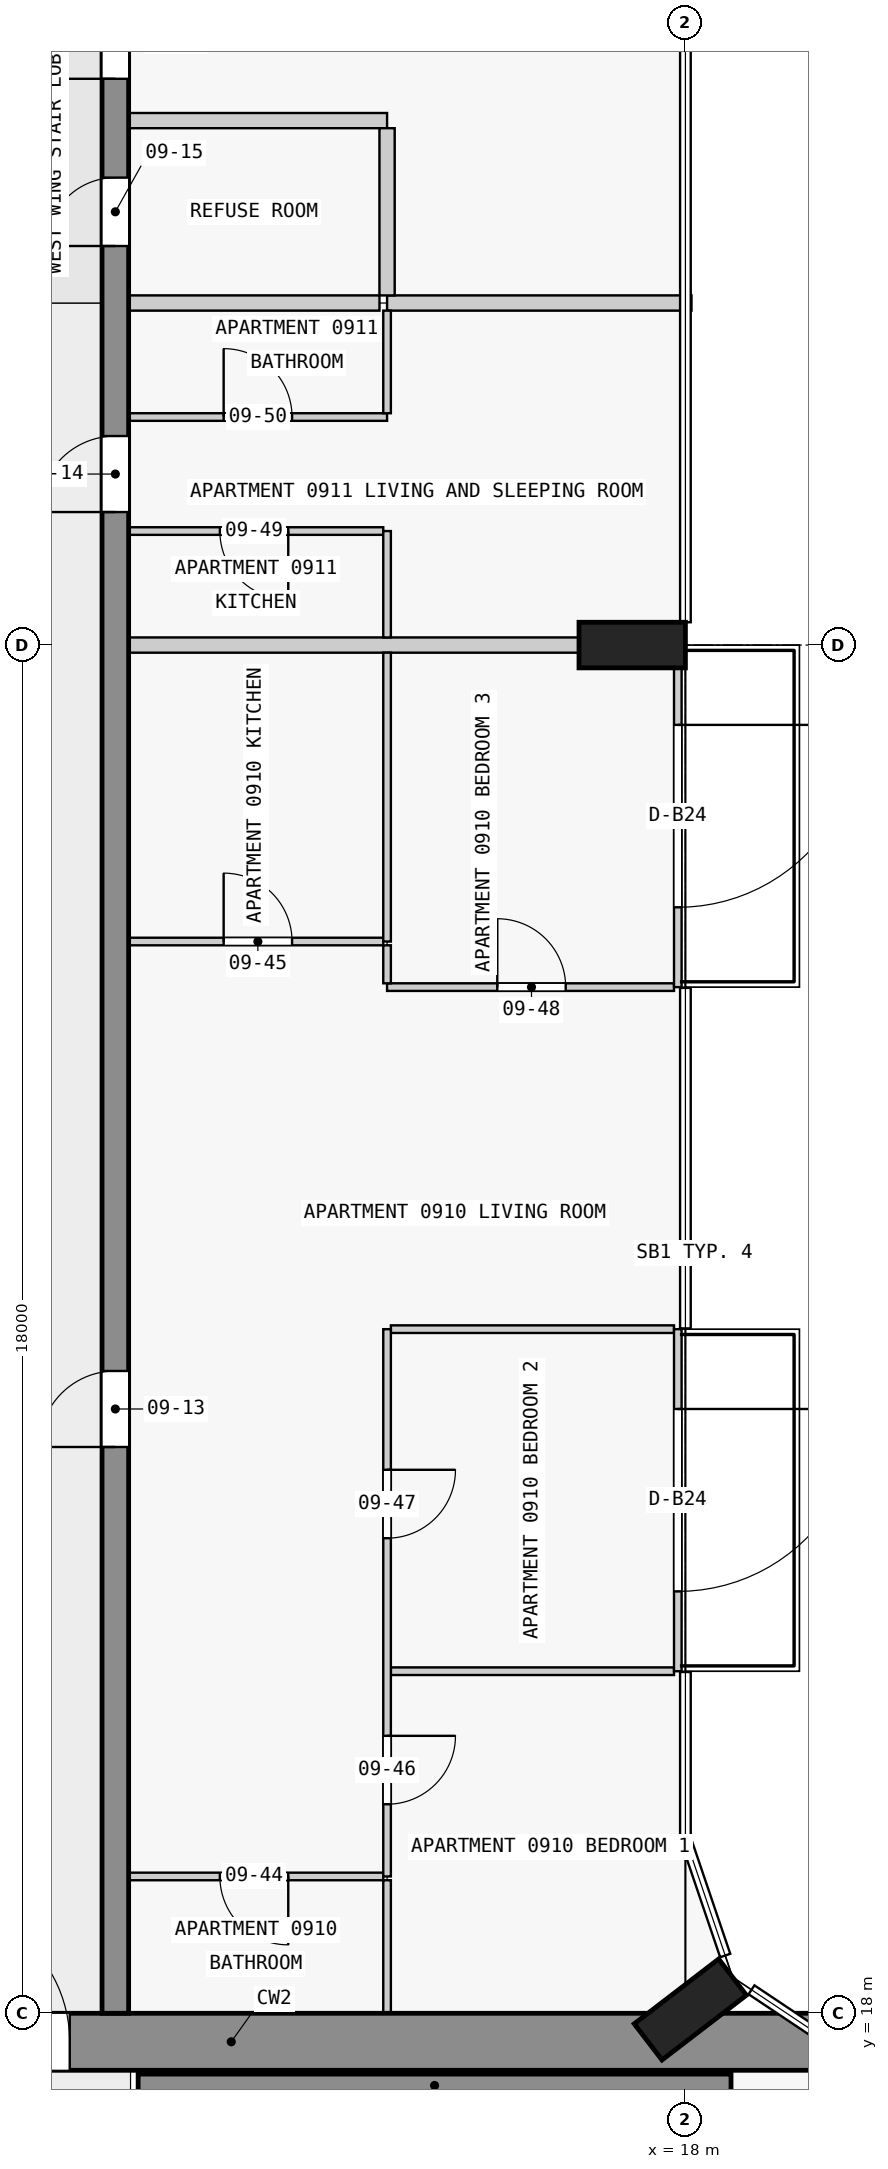
"""IFC4 building model, lengths in metres.
Left out: names, types, materials, properties, quantities, classifications, styles, units other than length and angle.
Written with IfcOpenShell. Run it as: python <this file> out.ifc"""

import sys

from ifc_helpers import new_model, si_unit, direction, frame, frame_2d, origin, origin_2d, place, context, subcontext, project, spatial, rectangle, extrude, element, fill, save


model = new_model("IFC4")
c1 = context("Model", 3, precision=1e-05, world=origin(), true_north=direction((0.0, 1.0)))
c2 = subcontext(c1, "Body", "Model", "MODEL_VIEW")
j1 = project(units=[si_unit("LENGTHUNIT", "METRE"), si_unit("PLANEANGLEUNIT", "RADIAN")], contexts=[c1])
p1 = place(None, origin())
s1 = spatial("IfcSite", under=j1, at=p1, CompositionType="ELEMENT")
p2 = place(p1, origin())
s2 = spatial("IfcBuilding", under=s1, at=p2, CompositionType="ELEMENT")
p3 = place(p2, frame((0.0, 0.0, 40.8)))
s3 = spatial("IfcBuildingStorey", under=s2, at=p3, CompositionType="ELEMENT", Elevation=40.8)
for number, where, z_axis, x_axis in (
    (1, (18.065, 18.05, 0.0), (0.0, 0.0, 1.0), (-0.609, 0.793, 0.0)),
    (2, (17.3, 36.0, 0.0), (0.0, 0.0, 1.0), (0.0, 1.0, 0.0)),
):
    element("IfcColumn", number, at=place(p3, frame(where, z_axis=z_axis, x_axis=x_axis)), inside=s3, PredefinedType="COLUMN", context=c2, shape_type="SweptSolid", body=[
        extrude(rectangle(XDim=0.6, YDim=1.4, at=origin_2d()), origin(), (0.0, 0.0, 1.0), 3.5),
    ])
p4 = place(p3, frame((1.55, 17.625, 0.0), z_axis=(0.0, 0.0, 1.0), x_axis=(1.0, 0.0, 0.0)))
e3 = element("IfcWall", 3, at=p4, inside=s3, PredefinedType="SHEAR", context=c2, shape_type="SweptSolid", body=[
    extrude(rectangle(XDim=20.95, YDim=0.75, at=frame_2d((10.475, 0.0))), origin(), (0.0, 0.0, 1.0), 3.25),
])
p5 = place(p4, frame((6.55, 0.0, 0.0)))
e4 = element("IfcOpeningElement", 4, at=p5, cuts=e3, PredefinedType="OPENING", context=c2, shape_type="SweptSolid", body=[
    extrude(rectangle(XDim=1.8, YDim=2.1, at=frame_2d((0.9, 1.05))), frame((0.0, 0.385, 0.0), z_axis=(0.0, -1.0, 0.0), x_axis=(1.0, 0.0, 0.0)), (0.0, 0.0, 1.0), 0.77),
])
p6 = place(p3, frame((10.8, 17.05, 0.0), z_axis=(0.0, 0.0, 1.0), x_axis=(1.0, 0.0, 0.0)))
e5 = element("IfcWall", 5, at=p6, inside=s3, PredefinedType="SHEAR", context=c2, shape_type="SweptSolid", body=[
    extrude(rectangle(XDim=7.8, YDim=0.3, at=frame_2d((3.9, 0.0))), origin(), (0.0, 0.0, 1.0), 3.25),
])
p7 = place(p3, frame((10.5, 18.0, 0.0), z_axis=(0.0, 0.0, 1.0), x_axis=(0.0, 1.0, 0.0)))
e6 = element("IfcWall", 6, at=p7, inside=s3, PredefinedType="SHEAR", context=c2, shape_type="SweptSolid", body=[
    extrude(rectangle(XDim=27.0, YDim=0.35, at=frame_2d((13.5, 0.0))), origin(), (0.0, 0.0, 1.0), 3.25),
])
p8 = place(p7, frame((7.45, 0.0, 0.0)))
e7 = element("IfcOpeningElement", 7, at=p8, cuts=e6, PredefinedType="OPENING", context=c2, shape_type="SweptSolid", body=[
    extrude(rectangle(XDim=1.0, YDim=2.1, at=frame_2d((0.5, 1.05))), frame((0.0, 0.185, 0.0), z_axis=(0.0, -1.0, 0.0), x_axis=(1.0, 0.0, 0.0)), (0.0, 0.0, 1.0), 0.37),
])
p9 = place(p7, frame((19.75, 0.0, 0.0)))
e8 = element("IfcOpeningElement", 8, at=p9, cuts=e6, PredefinedType="OPENING", context=c2, shape_type="SweptSolid", body=[
    extrude(rectangle(XDim=1.0, YDim=2.1, at=frame_2d((0.5, 1.05))), frame((0.0, 0.185, 0.0), z_axis=(0.0, -1.0, 0.0), x_axis=(1.0, 0.0, 0.0)), (0.0, 0.0, 1.0), 0.37),
])
p10 = place(p7, frame((23.25, 0.0, 0.0)))
e9 = element("IfcOpeningElement", 9, at=p10, cuts=e6, PredefinedType="OPENING", context=c2, shape_type="SweptSolid", body=[
    extrude(rectangle(XDim=0.9, YDim=2.1, at=frame_2d((0.45, 1.05))), frame((0.0, 0.185, 0.0), z_axis=(0.0, -1.0, 0.0), x_axis=(1.0, 0.0, 0.0)), (0.0, 0.0, 1.0), 0.37),
])
p11 = place(p7, frame((25.45, 0.0, 0.0)))
e10 = element("IfcOpeningElement", 10, at=p11, cuts=e6, PredefinedType="OPENING", context=c2, shape_type="SweptSolid", body=[
    extrude(rectangle(XDim=1.0, YDim=2.1, at=frame_2d((0.5, 1.05))), frame((0.0, 0.185, 0.0), z_axis=(0.0, -1.0, 0.0), x_axis=(1.0, 0.0, 0.0)), (0.0, 0.0, 1.0), 0.37),
])
p12 = place(p3, frame((17.9, 27.0, 0.0), z_axis=(0.0, 0.0, 1.0), x_axis=(0.0, -1.0, 0.0)))
e11 = element("IfcWall", 11, at=p12, inside=s3, PredefinedType="STANDARD", context=c2, shape_type="SweptSolid", body=[
    extrude(rectangle(XDim=4.5, YDim=0.1, at=frame_2d((2.25, 0.0))), origin(), (0.0, 0.0, 1.0), 3.25),
])
p13 = place(p12, frame((1.05, 0.0, 0.0)))
e12 = element("IfcOpeningElement", 12, at=p13, cuts=e11, PredefinedType="OPENING", context=c2, shape_type="SweptSolid", body=[
    extrude(rectangle(XDim=2.4, YDim=2.4, at=frame_2d((1.2, 1.2))), frame((0.0, 0.06, 0.0), z_axis=(0.0, -1.0, 0.0), x_axis=(1.0, 0.0, 0.0)), (0.0, 0.0, 1.0), 0.12),
])
p14 = place(p3, frame((17.9, 36.0, 0.0), z_axis=(0.0, 0.0, 1.0), x_axis=(0.0, -1.0, 0.0)))
e13 = element("IfcWall", 13, at=p14, inside=s3, PredefinedType="STANDARD", context=c2, shape_type="SweptSolid", body=[
    extrude(rectangle(XDim=4.5, YDim=0.1, at=frame_2d((2.25, 0.0))), origin(), (0.0, 0.0, 1.0), 3.25),
])
p15 = place(p14, frame((1.05, 0.0, 0.0)))
e14 = element("IfcOpeningElement", 14, at=p15, cuts=e13, PredefinedType="OPENING", context=c2, shape_type="SweptSolid", body=[
    extrude(rectangle(XDim=2.4, YDim=2.4, at=frame_2d((1.2, 1.2))), frame((0.0, 0.06, 0.0), z_axis=(0.0, -1.0, 0.0), x_axis=(1.0, 0.0, 0.0)), (0.0, 0.0, 1.0), 0.12),
])
p16 = place(p3, frame((14.025, 19.8, 0.0), z_axis=(0.0, 0.0, 1.0), x_axis=(-1.0, 0.0, 0.0)))
e15 = element("IfcWall", 15, at=p16, inside=s3, PredefinedType="PARTITIONING", context=c2, shape_type="SweptSolid", body=[
    extrude(rectangle(XDim=3.35, YDim=0.1, at=frame_2d((1.675, 0.0))), origin(), (0.0, 0.0, 1.0), 3.25),
])
p17 = place(p16, frame((1.25, 0.0, 0.0)))
e16 = element("IfcOpeningElement", 16, at=p17, cuts=e15, PredefinedType="OPENING", context=c2, shape_type="SweptSolid", body=[
    extrude(rectangle(XDim=0.9, YDim=2.1, at=frame_2d((0.45, 1.05))), frame((0.0, 0.06, 0.0), z_axis=(0.0, -1.0, 0.0), x_axis=(1.0, 0.0, 0.0)), (0.0, 0.0, 1.0), 0.12),
])
for number, where, z_axis, x_axis in (
    (17, (17.85, 22.5, 0.0), (0.0, 0.0, 1.0), (-1.0, 0.0, 0.0)),
    (18, (17.85, 27.0, 0.0), (0.0, 0.0, 1.0), (-1.0, 0.0, 0.0)),
):
    element("IfcWall", number, at=place(p3, frame(where, z_axis=z_axis, x_axis=x_axis)), inside=s3, PredefinedType="PARTITIONING", context=c2, shape_type="SweptSolid", body=[
        extrude(rectangle(XDim=3.725, YDim=0.1, at=frame_2d((1.863, 0.0))), origin(), (0.0, 0.0, 1.0), 3.25),
    ])
p18 = place(p3, frame((14.075, 31.5, 0.0), z_axis=(0.0, 0.0, 1.0), x_axis=(1.0, 0.0, 0.0)))
e19 = element("IfcWall", 19, at=p18, inside=s3, PredefinedType="PARTITIONING", context=c2, shape_type="SweptSolid", body=[
    extrude(rectangle(XDim=3.775, YDim=0.1, at=frame_2d((1.888, 0.0))), origin(), (0.0, 0.0, 1.0), 3.25),
])
p19 = place(p18, frame((1.45, 0.0, 0.0)))
e20 = element("IfcOpeningElement", 20, at=p19, cuts=e19, PredefinedType="OPENING", context=c2, shape_type="SweptSolid", body=[
    extrude(rectangle(XDim=0.9, YDim=2.1, at=frame_2d((0.45, 1.05))), frame((0.0, 0.06, 0.0), z_axis=(0.0, -1.0, 0.0), x_axis=(1.0, 0.0, 0.0)), (0.0, 0.0, 1.0), 0.12),
])
p20 = place(p3, frame((10.675, 32.1, 0.0), z_axis=(0.0, 0.0, 1.0), x_axis=(1.0, 0.0, 0.0)))
e21 = element("IfcWall", 21, at=p20, inside=s3, PredefinedType="PARTITIONING", context=c2, shape_type="SweptSolid", body=[
    extrude(rectangle(XDim=3.35, YDim=0.1, at=frame_2d((1.675, 0.0))), origin(), (0.0, 0.0, 1.0), 3.25),
])
p21 = place(p20, frame((1.25, 0.0, 0.0)))
e22 = element("IfcOpeningElement", 22, at=p21, cuts=e21, PredefinedType="OPENING", context=c2, shape_type="SweptSolid", body=[
    extrude(rectangle(XDim=0.9, YDim=2.1, at=frame_2d((0.45, 1.05))), frame((0.0, 0.06, 0.0), z_axis=(0.0, -1.0, 0.0), x_axis=(1.0, 0.0, 0.0)), (0.0, 0.0, 1.0), 0.12),
])
p22 = place(p3, frame((16.6, 36.0, 0.0), z_axis=(0.0, 0.0, 1.0), x_axis=(-1.0, 0.0, 0.0)))
e23 = element("IfcWall", 23, at=p22, inside=s3, PredefinedType="PARTITIONING", context=c2, shape_type="SweptSolid", body=[
    extrude(rectangle(XDim=5.925, YDim=0.2, at=frame_2d((2.962, 0.0))), origin(), (0.0, 0.0, 1.0), 3.25),
])
p23 = place(p3, frame((14.025, 37.5, 0.0), z_axis=(0.0, 0.0, 1.0), x_axis=(-1.0, 0.0, 0.0)))
e24 = element("IfcWall", 24, at=p23, inside=s3, PredefinedType="PARTITIONING", context=c2, shape_type="SweptSolid", body=[
    extrude(rectangle(XDim=3.35, YDim=0.1, at=frame_2d((1.675, 0.0))), origin(), (0.0, 0.0, 1.0), 3.25),
])
p24 = place(p23, frame((1.25, 0.0, 0.0)))
e25 = element("IfcOpeningElement", 25, at=p24, cuts=e24, PredefinedType="OPENING", context=c2, shape_type="SweptSolid", body=[
    extrude(rectangle(XDim=0.9, YDim=2.1, at=frame_2d((0.45, 1.05))), frame((0.0, 0.06, 0.0), z_axis=(0.0, -1.0, 0.0), x_axis=(1.0, 0.0, 0.0)), (0.0, 0.0, 1.0), 0.12),
])
p25 = place(p3, frame((10.675, 39.0, 0.0), z_axis=(0.0, 0.0, 1.0), x_axis=(1.0, 0.0, 0.0)))
e26 = element("IfcWall", 26, at=p25, inside=s3, PredefinedType="PARTITIONING", context=c2, shape_type="SweptSolid", body=[
    extrude(rectangle(XDim=3.4, YDim=0.1, at=frame_2d((1.7, 0.0))), origin(), (0.0, 0.0, 1.0), 3.25),
])
p26 = place(p25, frame((1.25, 0.0, 0.0)))
e27 = element("IfcOpeningElement", 27, at=p26, cuts=e26, PredefinedType="OPENING", context=c2, shape_type="SweptSolid", body=[
    extrude(rectangle(XDim=0.9, YDim=2.1, at=frame_2d((0.45, 1.05))), frame((0.0, 0.06, 0.0), z_axis=(0.0, -1.0, 0.0), x_axis=(1.0, 0.0, 0.0)), (0.0, 0.0, 1.0), 0.12),
])
p27 = place(p3, frame((13.975, 40.5, 0.0), z_axis=(0.0, 0.0, 1.0), x_axis=(-1.0, 0.0, 0.0)))
e28 = element("IfcWall", 28, at=p27, inside=s3, PredefinedType="PARTITIONING", context=c2, shape_type="SweptSolid", body=[
    extrude(rectangle(XDim=3.3, YDim=0.2, at=frame_2d((1.65, 0.0))), origin(), (0.0, 0.0, 1.0), 3.25),
])
p28 = place(p3, frame((14.075, 40.5, 0.0), z_axis=(0.0, 0.0, 1.0), x_axis=(1.0, 0.0, 0.0)))
e29 = element("IfcWall", 29, at=p28, inside=s3, PredefinedType="PARTITIONING", context=c2, shape_type="SweptSolid", body=[
    extrude(rectangle(XDim=4.005, YDim=0.2, at=frame_2d((2.002, 0.0))), origin(), (0.0, 0.0, 1.0), 3.25),
])
p29 = place(p3, frame((14.075, 42.9, 0.0), z_axis=(0.0, 0.0, 1.0), x_axis=(-1.0, 0.0, 0.0)))
e30 = element("IfcWall", 30, at=p29, inside=s3, PredefinedType="PARTITIONING", context=c2, shape_type="SweptSolid", body=[
    extrude(rectangle(XDim=3.4, YDim=0.2, at=frame_2d((1.7, 0.0))), origin(), (0.0, 0.0, 1.0), 3.25),
])
p30 = place(p3, frame((14.075, 27.0, 0.0), z_axis=(0.0, 0.0, 1.0), x_axis=(0.0, -1.0, 0.0)))
e31 = element("IfcWall", 31, at=p30, inside=s3, PredefinedType="PARTITIONING", context=c2, shape_type="SweptSolid", body=[
    extrude(rectangle(XDim=7.2, YDim=0.1, at=frame_2d((3.6, 0.0))), origin(), (0.0, 0.0, 1.0), 3.25),
])
p31 = place(p30, frame((5.35, 0.0, 0.0)))
e32 = element("IfcOpeningElement", 32, at=p31, cuts=e31, PredefinedType="OPENING", context=c2, shape_type="SweptSolid", body=[
    extrude(rectangle(XDim=0.9, YDim=2.1, at=frame_2d((0.45, 1.05))), frame((0.0, 0.06, 0.0), z_axis=(0.0, -1.0, 0.0), x_axis=(1.0, 0.0, 0.0)), (0.0, 0.0, 1.0), 0.12),
])
p32 = place(p30, frame((1.85, 0.0, 0.0)))
e33 = element("IfcOpeningElement", 33, at=p32, cuts=e31, PredefinedType="OPENING", context=c2, shape_type="SweptSolid", body=[
    extrude(rectangle(XDim=0.9, YDim=2.1, at=frame_2d((0.45, 1.05))), frame((0.0, 0.06, 0.0), z_axis=(0.0, -1.0, 0.0), x_axis=(1.0, 0.0, 0.0)), (0.0, 0.0, 1.0), 0.12),
])
p33 = place(p3, frame((14.075, 32.05, 0.0), z_axis=(0.0, 0.0, 1.0), x_axis=(0.0, -1.0, 0.0)))
e34 = element("IfcWall", 34, at=p33, inside=s3, PredefinedType="PARTITIONING", context=c2, shape_type="SweptSolid", body=[
    extrude(rectangle(XDim=0.5, YDim=0.1, at=frame_2d((0.25, 0.0))), origin(), (0.0, 0.0, 1.0), 3.25),
])
p34 = place(p3, frame((14.075, 18.0, 0.0), z_axis=(0.0, 0.0, 1.0), x_axis=(0.0, 1.0, 0.0)))
e35 = element("IfcWall", 35, at=p34, inside=s3, PredefinedType="PARTITIONING", context=c2, shape_type="SweptSolid", body=[
    extrude(rectangle(XDim=1.75, YDim=0.1, at=frame_2d((0.875, 0.0))), origin(), (0.0, 0.0, 1.0), 3.25),
])
p35 = place(p3, frame((14.075, 32.1, 0.0), z_axis=(0.0, 0.0, 1.0), x_axis=(0.0, 1.0, 0.0)))
e36 = element("IfcWall", 36, at=p35, inside=s3, PredefinedType="PARTITIONING", context=c2, shape_type="SweptSolid", body=[
    extrude(rectangle(XDim=3.8, YDim=0.1, at=frame_2d((1.9, 0.0))), origin(), (0.0, 0.0, 1.0), 3.25),
])
p36 = place(p3, frame((14.075, 36.1, 0.0), z_axis=(0.0, 0.0, 1.0), x_axis=(0.0, 1.0, 0.0)))
e37 = element("IfcWall", 37, at=p36, inside=s3, PredefinedType="PARTITIONING", context=c2, shape_type="SweptSolid", body=[
    extrude(rectangle(XDim=1.4, YDim=0.1, at=frame_2d((0.7, 0.0))), origin(), (0.0, 0.0, 1.0), 3.25),
])
p37 = place(p3, frame((14.075, 39.05, 0.0), z_axis=(0.0, 0.0, 1.0), x_axis=(0.0, 1.0, 0.0)))
e38 = element("IfcWall", 38, at=p37, inside=s3, PredefinedType="PARTITIONING", context=c2, shape_type="SweptSolid", body=[
    extrude(rectangle(XDim=1.35, YDim=0.1, at=frame_2d((0.675, 0.0))), origin(), (0.0, 0.0, 1.0), 3.25),
])
p38 = place(p3, frame((14.075, 40.6, 0.0), z_axis=(0.0, 0.0, 1.0), x_axis=(0.0, 1.0, 0.0)))
e39 = element("IfcWall", 39, at=p38, inside=s3, PredefinedType="PARTITIONING", context=c2, shape_type="SweptSolid", body=[
    extrude(rectangle(XDim=2.2, YDim=0.2, at=frame_2d((1.1, 0.0))), origin(), (0.0, 0.0, 1.0), 3.25),
])
p39 = place(p13, origin())
e40 = element("IfcDoor", 40, at=p39, inside=s3, OperationType="SINGLE_SWING_LEFT", PredefinedType="DOOR", context=c2, shape_type="SweptSolid", body=[
    extrude(rectangle(XDim=2.4, YDim=2.4, at=frame_2d((1.2, 1.2))), frame((0.0, 0.025, 0.0), z_axis=(0.0, -1.0, 0.0), x_axis=(1.0, 0.0, 0.0)), (0.0, 0.0, 1.0), 0.05),
])
fill(e12, e40)
p40 = place(p15, origin())
e41 = element("IfcDoor", 41, at=p40, inside=s3, OperationType="SINGLE_SWING_LEFT", PredefinedType="DOOR", context=c2, shape_type="SweptSolid", body=[
    extrude(rectangle(XDim=2.4, YDim=2.4, at=frame_2d((1.2, 1.2))), frame((0.0, 0.025, 0.0), z_axis=(0.0, -1.0, 0.0), x_axis=(1.0, 0.0, 0.0)), (0.0, 0.0, 1.0), 0.05),
])
fill(e14, e41)
p41 = place(p5, origin())
e42 = element("IfcDoor", 42, at=p41, inside=s3, OperationType="DOUBLE_DOOR_SINGLE_SWING", PredefinedType="DOOR", context=c2, shape_type="SweptSolid", body=[
    extrude(rectangle(XDim=1.8, YDim=2.1, at=frame_2d((0.9, 1.05))), frame((0.0, 0.025, 0.0), z_axis=(0.0, -1.0, 0.0), x_axis=(1.0, 0.0, 0.0)), (0.0, 0.0, 1.0), 0.05),
])
fill(e4, e42)
p42 = place(p8, origin())
e43 = element("IfcDoor", 43, at=p42, inside=s3, OperationType="SINGLE_SWING_LEFT", PredefinedType="DOOR", context=c2, shape_type="SweptSolid", body=[
    extrude(rectangle(XDim=1.0, YDim=2.1, at=frame_2d((0.5, 1.05))), frame((0.0, 0.025, 0.0), z_axis=(0.0, -1.0, 0.0), x_axis=(1.0, 0.0, 0.0)), (0.0, 0.0, 1.0), 0.05),
])
fill(e7, e43)
p43 = place(p9, origin())
e44 = element("IfcDoor", 44, at=p43, inside=s3, OperationType="SINGLE_SWING_RIGHT", PredefinedType="DOOR", context=c2, shape_type="SweptSolid", body=[
    extrude(rectangle(XDim=1.0, YDim=2.1, at=frame_2d((0.5, 1.05))), frame((0.0, 0.025, 0.0), z_axis=(0.0, -1.0, 0.0), x_axis=(1.0, 0.0, 0.0)), (0.0, 0.0, 1.0), 0.05),
])
fill(e8, e44)
p44 = place(p10, origin())
e45 = element("IfcDoor", 45, at=p44, inside=s3, OperationType="SINGLE_SWING_RIGHT", PredefinedType="DOOR", context=c2, shape_type="SweptSolid", body=[
    extrude(rectangle(XDim=0.9, YDim=2.1, at=frame_2d((0.45, 1.05))), frame((0.0, 0.025, 0.0), z_axis=(0.0, -1.0, 0.0), x_axis=(1.0, 0.0, 0.0)), (0.0, 0.0, 1.0), 0.05),
])
fill(e9, e45)
p45 = place(p11, origin())
e46 = element("IfcDoor", 46, at=p45, inside=s3, OperationType="SINGLE_SWING_RIGHT", PredefinedType="DOOR", context=c2, shape_type="SweptSolid", body=[
    extrude(rectangle(XDim=1.0, YDim=2.1, at=frame_2d((0.5, 1.05))), frame((0.0, 0.025, 0.0), z_axis=(0.0, -1.0, 0.0), x_axis=(1.0, 0.0, 0.0)), (0.0, 0.0, 1.0), 0.05),
])
fill(e10, e46)
p46 = place(p17, origin())
e47 = element("IfcDoor", 47, at=p46, inside=s3, OperationType="SINGLE_SWING_RIGHT", PredefinedType="DOOR", context=c2, shape_type="SweptSolid", body=[
    extrude(rectangle(XDim=0.9, YDim=2.1, at=frame_2d((0.45, 1.05))), frame((0.0, 0.025, 0.0), z_axis=(0.0, -1.0, 0.0), x_axis=(1.0, 0.0, 0.0)), (0.0, 0.0, 1.0), 0.05),
])
fill(e16, e47)
p47 = place(p21, origin())
e48 = element("IfcDoor", 48, at=p47, inside=s3, OperationType="SINGLE_SWING_RIGHT", PredefinedType="DOOR", context=c2, shape_type="SweptSolid", body=[
    extrude(rectangle(XDim=0.9, YDim=2.1, at=frame_2d((0.45, 1.05))), frame((0.0, 0.025, 0.0), z_axis=(0.0, -1.0, 0.0), x_axis=(1.0, 0.0, 0.0)), (0.0, 0.0, 1.0), 0.05),
])
fill(e22, e48)
p48 = place(p31, origin())
e49 = element("IfcDoor", 49, at=p48, inside=s3, OperationType="SINGLE_SWING_RIGHT", PredefinedType="DOOR", context=c2, shape_type="SweptSolid", body=[
    extrude(rectangle(XDim=0.9, YDim=2.1, at=frame_2d((0.45, 1.05))), frame((0.0, 0.025, 0.0), z_axis=(0.0, -1.0, 0.0), x_axis=(1.0, 0.0, 0.0)), (0.0, 0.0, 1.0), 0.05),
])
fill(e32, e49)
p49 = place(p32, origin())
e50 = element("IfcDoor", 50, at=p49, inside=s3, OperationType="SINGLE_SWING_LEFT", PredefinedType="DOOR", context=c2, shape_type="SweptSolid", body=[
    extrude(rectangle(XDim=0.9, YDim=2.1, at=frame_2d((0.45, 1.05))), frame((0.0, 0.025, 0.0), z_axis=(0.0, -1.0, 0.0), x_axis=(1.0, 0.0, 0.0)), (0.0, 0.0, 1.0), 0.05),
])
fill(e33, e50)
p50 = place(p19, origin())
e51 = element("IfcDoor", 51, at=p50, inside=s3, OperationType="SINGLE_SWING_RIGHT", PredefinedType="DOOR", context=c2, shape_type="SweptSolid", body=[
    extrude(rectangle(XDim=0.9, YDim=2.1, at=frame_2d((0.45, 1.05))), frame((0.0, 0.025, 0.0), z_axis=(0.0, -1.0, 0.0), x_axis=(1.0, 0.0, 0.0)), (0.0, 0.0, 1.0), 0.05),
])
fill(e20, e51)
p51 = place(p24, origin())
e52 = element("IfcDoor", 52, at=p51, inside=s3, OperationType="SINGLE_SWING_RIGHT", PredefinedType="DOOR", context=c2, shape_type="SweptSolid", body=[
    extrude(rectangle(XDim=0.9, YDim=2.1, at=frame_2d((0.45, 1.05))), frame((0.0, 0.025, 0.0), z_axis=(0.0, -1.0, 0.0), x_axis=(1.0, 0.0, 0.0)), (0.0, 0.0, 1.0), 0.05),
])
fill(e25, e52)
p52 = place(p26, origin())
e53 = element("IfcDoor", 53, at=p52, inside=s3, OperationType="SINGLE_SWING_RIGHT", PredefinedType="DOOR", context=c2, shape_type="SweptSolid", body=[
    extrude(rectangle(XDim=0.9, YDim=2.1, at=frame_2d((0.45, 1.05))), frame((0.0, 0.025, 0.0), z_axis=(0.0, -1.0, 0.0), x_axis=(1.0, 0.0, 0.0)), (0.0, 0.0, 1.0), 0.05),
])
fill(e27, e53)
save(model, sys.argv[1])
